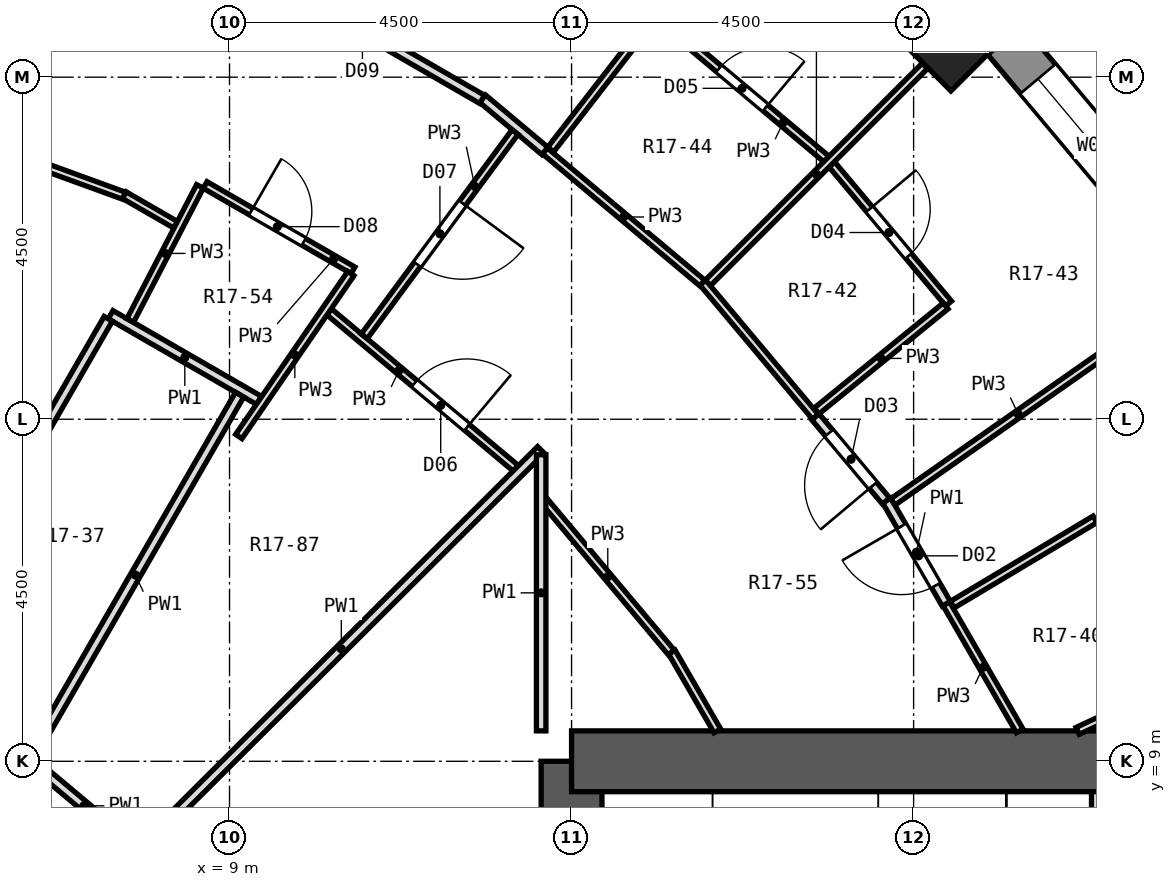
"""IFC4 building model, lengths in metres.
Left out: names, types, materials, properties, quantities, classifications, styles, units other than length and angle.
Written with IfcOpenShell. Run it as: python <this file> out.ifc"""

import sys

from ifc_helpers import new_model, si_unit, direction, frame, frame_2d, origin, origin_2d, place, context, subcontext, project, spatial, polyline, rectangle, outline, extrude, element, fill, save


model = new_model("IFC4")
c1 = context("Model", 3, precision=1e-05, world=origin(), true_north=direction((0.0, 1.0)))
c2 = subcontext(c1, "Body", "Model", "MODEL_VIEW")
j1 = project(units=[si_unit("LENGTHUNIT", "METRE"), si_unit("PLANEANGLEUNIT", "RADIAN")], contexts=[c1])
p1 = place(None, origin())
s1 = spatial("IfcSite", under=j1, at=p1, CompositionType="ELEMENT")
p2 = place(p1, origin())
s2 = spatial("IfcBuilding", under=s1, at=p2, CompositionType="ELEMENT")
p3 = place(p2, frame((0.0, 0.0, 91.9)))
s3 = spatial("IfcBuildingStorey", under=s2, at=p3, CompositionType="ELEMENT", Elevation=91.9)
p4 = place(p3, frame((18.491, 18.491, 0.0), z_axis=(0.0, 0.0, 1.0), x_axis=(0.707106781187, 0.707106781187, 0.0)))
e1 = element("IfcColumn", 1, at=p4, inside=s3, PredefinedType="COLUMN", context=c2, shape_type="SweptSolid", body=[
    extrude(rectangle(XDim=0.95, YDim=0.95, at=origin_2d()), origin(), (0.0, 0.0, 1.0), 3.3),
])
p5 = place(p3, frame((13.5, -9.0, 0.0), z_axis=(0.0, 0.0, 1.0), x_axis=(0.0, 1.0, 0.0)))
e2 = element("IfcWall", 2, at=p5, inside=s3, PredefinedType="SHEAR", context=c2, shape_type="SweptSolid", body=[
    extrude(rectangle(XDim=18.0, YDim=0.8, at=frame_2d((9.0, 0.0))), origin(), (0.0, 0.0, 1.0), 3.3),
])
p6 = place(p5, frame((15.4, 0.0, 0.0)))
e3 = element("IfcOpeningElement", 3, at=p6, cuts=e2, PredefinedType="OPENING", context=c2, shape_type="SweptSolid", body=[
    extrude(rectangle(XDim=1.2, YDim=2.1, at=frame_2d((0.6, 1.05))), frame((0.0, 0.412, 0.0), z_axis=(0.0, -1.0, 0.0), x_axis=(1.0, 0.0, 0.0)), (0.0, 0.0, 1.0), 0.824),
])
p7 = place(p5, frame((1.4, 0.0, 0.0)))
e4 = element("IfcOpeningElement", 4, at=p7, cuts=e2, PredefinedType="OPENING", context=c2, shape_type="SweptSolid", body=[
    extrude(rectangle(XDim=1.2, YDim=2.1, at=frame_2d((0.6, 1.05))), frame((0.0, 0.412, 0.0), z_axis=(0.0, -1.0, 0.0), x_axis=(1.0, 0.0, 0.0)), (0.0, 0.0, 1.0), 0.824),
])
p8 = place(p5, frame((7.5, 0.0, 0.0)))
e5 = element("IfcOpeningElement", 5, at=p8, cuts=e2, PredefinedType="OPENING", context=c2, shape_type="SweptSolid", body=[
    extrude(rectangle(XDim=3.0, YDim=2.4, at=frame_2d((1.5, 1.2))), frame((0.0, 0.412, 0.0), z_axis=(0.0, -1.0, 0.0), x_axis=(1.0, 0.0, 0.0)), (0.0, 0.0, 1.0), 0.824),
])
p9 = place(p3, frame((13.5, 9.0, 0.0), z_axis=(0.0, 0.0, 1.0), x_axis=(1.0, 0.0, 0.0)))
e6 = element("IfcWall", 6, at=p9, inside=s3, PredefinedType="SHEAR", context=c2, shape_type="SweptSolid", body=[
    extrude(rectangle(XDim=10.4, YDim=0.8, at=frame_2d((5.2, 0.0))), origin(), (0.0, 0.0, 1.0), 3.3),
])
p10 = place(p3, frame((21.547, 15.699, 0.0), z_axis=(0.0, 0.0, 1.0), x_axis=(-0.642774476932, 0.766055462616, 0.0)))
e7 = element("IfcWall", 7, at=p10, inside=s3, PredefinedType="SOLIDWALL", context=c2, shape_type="SweptSolid", body=[
    extrude(rectangle(XDim=3.648, YDim=0.6, at=frame_2d((1.824, 0.0))), origin(), (0.0, 0.0, 1.0), 2.8),
])
p11 = place(p10, frame((0.674, 0.0, 0.9)))
e8 = element("IfcOpeningElement", 8, at=p11, cuts=e7, PredefinedType="OPENING", context=c2, shape_type="SweptSolid", body=[
    extrude(rectangle(XDim=2.3, YDim=1.8, at=frame_2d((1.15, 0.9))), frame((0.0, 0.312, 0.0), z_axis=(0.0, -1.0, 0.0), x_axis=(1.0, 0.0, 0.0)), (0.0, 0.0, 1.0), 0.624),
])
p12 = place(p3, origin())
e9 = element("IfcWall", 9, at=p12, inside=s3, PredefinedType="SOLIDWALL", context=c2, shape_type="SweptSolid", body=[
    extrude(outline(polyline([(19.432, 18.686), (18.686, 19.432), (18.301, 18.972), (18.491, 19.163), (19.163, 18.491), (18.972, 18.301), (19.432, 18.686)])), origin(), (0.0, 0.0, 1.0), 2.8),
])
p13 = place(p3, frame((14.819, 10.438, 0.0), z_axis=(0.0, 0.0, 1.0), x_axis=(0.500016292001, -0.866015997389, 0.0)))
e10 = element("IfcWall", 10, at=p13, inside=s3, PredefinedType="PARTITIONING", context=c2, shape_type="SweptSolid", body=[
    extrude(rectangle(XDim=1.199, YDim=0.1, at=frame_2d((0.599, 0.0))), origin(), (0.0, 0.0, 1.0), 2.8),
])
p14 = place(p3, frame((18.43, 11.072, 0.0), z_axis=(0.0, 0.0, 1.0), x_axis=(0.500203884267, -0.865907659144, 0.0)))
e11 = element("IfcWall", 11, at=p14, inside=s3, PredefinedType="PARTITIONING", context=c2, shape_type="SweptSolid", body=[
    extrude(rectangle(XDim=1.931, YDim=0.1, at=frame_2d((0.966, 0.0))), origin(), (0.0, 0.0, 1.0), 2.8),
])
p15 = place(p3, frame((17.645, 12.432, 0.0), z_axis=(0.0, 0.0, 1.0), x_axis=(0.499852597388, -0.866110489998, 0.0)))
e12 = element("IfcWall", 12, at=p15, inside=s3, PredefinedType="PARTITIONING", context=c2, shape_type="SweptSolid", body=[
    extrude(rectangle(XDim=1.57, YDim=0.125, at=frame_2d((0.785, 0.0))), origin(), (0.0, 0.0, 1.0), 2.8),
])
p16 = place(p15, frame((0.392, 0.0, 0.0)))
e13 = element("IfcOpeningElement", 13, at=p16, cuts=e12, PredefinedType="OPENING", context=c2, shape_type="SweptSolid", body=[
    extrude(rectangle(XDim=0.9, YDim=2.1, at=frame_2d((0.45, 1.05))), frame((0.0, 0.074, 0.0), z_axis=(0.0, -1.0, 0.0), x_axis=(1.0, 0.0, 0.0)), (0.0, 0.0, 1.0), 0.149),
])
p17 = place(p3, frame((20.43, 12.209, 0.0), z_axis=(0.0, 0.0, 1.0), x_axis=(0.500061428766, -0.865989934965, 0.0)))
e14 = element("IfcWall", 14, at=p17, inside=s3, PredefinedType="PARTITIONING", context=c2, shape_type="SweptSolid", body=[
    extrude(rectangle(XDim=2.39, YDim=0.1, at=frame_2d((1.195, 0.0))), origin(), (0.0, 0.0, 1.0), 2.8),
])
p18 = place(p17, frame((0.82, 0.0, 0.0)))
e15 = element("IfcOpeningElement", 15, at=p18, cuts=e14, PredefinedType="OPENING", context=c2, shape_type="SweptSolid", body=[
    extrude(rectangle(XDim=0.8, YDim=2.1, at=frame_2d((0.4, 1.05))), frame((0.0, 0.062, 0.0), z_axis=(0.0, -1.0, 0.0), x_axis=(1.0, 0.0, 0.0)), (0.0, 0.0, 1.0), 0.124),
])
p19 = place(p3, frame((13.14, 12.425, 0.0), z_axis=(0.0, 0.0, 1.0), x_axis=(0.642692247105, -0.766124451712, 0.0)))
e16 = element("IfcWall", 16, at=p19, inside=s3, PredefinedType="PARTITIONING", context=c2, shape_type="SweptSolid", body=[
    extrude(rectangle(XDim=2.601, YDim=0.1, at=frame_2d((1.301, 0.0))), origin(), (0.0, 0.0, 1.0), 2.8),
])
p20 = place(p3, frame((15.226, 15.299, 0.0), z_axis=(0.0, 0.0, 1.0), x_axis=(0.642762571273, -0.766065452145, 0.0)))
e17 = element("IfcWall", 17, at=p20, inside=s3, PredefinedType="PARTITIONING", context=c2, shape_type="SweptSolid", body=[
    extrude(rectangle(XDim=2.307, YDim=0.1, at=frame_2d((1.153, 0.0))), origin(), (0.0, 0.0, 1.0), 2.8),
])
p21 = place(p3, frame((16.708, 13.532, 0.0), z_axis=(0.0, 0.0, 1.0), x_axis=(0.642641061866, -0.766167387458, 0.0)))
e18 = element("IfcWall", 18, at=p21, inside=s3, PredefinedType="PARTITIONING", context=c2, shape_type="SweptSolid", body=[
    extrude(rectangle(XDim=1.445, YDim=0.125, at=frame_2d((0.722, 0.0))), origin(), (0.0, 0.0, 1.0), 2.8),
])
p22 = place(p21, frame((0.279, 0.0, 0.0)))
e19 = element("IfcOpeningElement", 19, at=p22, cuts=e18, PredefinedType="OPENING", context=c2, shape_type="SweptSolid", body=[
    extrude(rectangle(XDim=0.9, YDim=2.1, at=frame_2d((0.45, 1.05))), frame((0.0, 0.074, 0.0), z_axis=(0.0, -1.0, 0.0), x_axis=(1.0, 0.0, 0.0)), (0.0, 0.0, 1.0), 0.149),
])
p23 = place(p3, frame((16.923, 16.853, 0.0), z_axis=(0.0, 0.0, 1.0), x_axis=(0.642942941421, -0.765914077477, 0.0)))
e20 = element("IfcWall", 20, at=p23, inside=s3, PredefinedType="PARTITIONING", context=c2, shape_type="SweptSolid", body=[
    extrude(rectangle(XDim=2.39, YDim=0.1, at=frame_2d((1.195, 0.0))), origin(), (0.0, 0.0, 1.0), 2.8),
])
p24 = place(p23, frame((0.77, 0.0, 0.0)))
e21 = element("IfcOpeningElement", 21, at=p24, cuts=e20, PredefinedType="OPENING", context=c2, shape_type="SweptSolid", body=[
    extrude(rectangle(XDim=0.8, YDim=2.1, at=frame_2d((0.4, 1.05))), frame((0.0, 0.062, 0.0), z_axis=(0.0, -1.0, 0.0), x_axis=(1.0, 0.0, 0.0)), (0.0, 0.0, 1.0), 0.124),
])
p25 = place(p3, frame((6.409, 8.981, 0.0), z_axis=(0.0, 0.0, 1.0), x_axis=(0.766209131969, -0.642591290081, 0.0)))
e22 = element("IfcWall", 22, at=p25, inside=s3, PredefinedType="PARTITIONING", context=c2, shape_type="SweptSolid", body=[
    extrude(rectangle(XDim=1.764, YDim=0.125, at=frame_2d((0.882, 0.0))), origin(), (0.0, 0.0, 1.0), 2.8),
])
p26 = place(p3, frame((10.311, 14.914, 0.0), z_axis=(0.0, 0.0, 1.0), x_axis=(0.766187913062, -0.642616590104, 0.0)))
e23 = element("IfcWall", 23, at=p26, inside=s3, PredefinedType="PARTITIONING", context=c2, shape_type="SweptSolid", body=[
    extrude(rectangle(XDim=3.205, YDim=0.1, at=frame_2d((1.602, 0.0))), origin(), (0.0, 0.0, 1.0), 2.8),
])
p27 = place(p26, frame((1.466, 0.0, 0.0)))
e24 = element("IfcOpeningElement", 24, at=p27, cuts=e23, PredefinedType="OPENING", context=c2, shape_type="SweptSolid", body=[
    extrude(rectangle(XDim=0.9, YDim=2.1, at=frame_2d((0.45, 1.05))), frame((0.0, 0.062, 0.0), z_axis=(0.0, -1.0, 0.0), x_axis=(1.0, 0.0, 0.0)), (0.0, 0.0, 1.0), 0.124),
])
p28 = place(p3, frame((13.149, 17.03, 0.0), z_axis=(0.0, 0.0, 1.0), x_axis=(0.766003631775, -0.642836243617, 0.0)))
e25 = element("IfcWall", 25, at=p28, inside=s3, PredefinedType="PARTITIONING", context=c2, shape_type="SweptSolid", body=[
    extrude(rectangle(XDim=2.704, YDim=0.1, at=frame_2d((1.352, 0.0))), origin(), (0.0, 0.0, 1.0), 2.8),
])
p29 = place(p3, frame((12.328, 17.718, 0.0), z_axis=(0.0, 0.0, 1.0), x_axis=(0.766311067441, -0.642469725292, 0.0)))
e26 = element("IfcWall", 26, at=p29, inside=s3, PredefinedType="PARTITIONING", context=c2, shape_type="SweptSolid", body=[
    extrude(rectangle(XDim=1.071, YDim=0.125, at=frame_2d((0.535, 0.0))), origin(), (0.0, 0.0, 1.0), 2.8),
])
p30 = place(p3, frame((14.597, 18.816, 0.0), z_axis=(0.0, 0.0, 1.0), x_axis=(0.766055897741, -0.642773958353, 0.0)))
e27 = element("IfcWall", 27, at=p30, inside=s3, PredefinedType="PARTITIONING", context=c2, shape_type="SweptSolid", body=[
    extrude(rectangle(XDim=2.945, YDim=0.1, at=frame_2d((1.472, 0.0))), origin(), (0.0, 0.0, 1.0), 2.8),
])
p31 = place(p30, frame((1.097, 0.0, 0.0)))
e28 = element("IfcOpeningElement", 28, at=p31, cuts=e27, PredefinedType="OPENING", context=c2, shape_type="SweptSolid", body=[
    extrude(rectangle(XDim=0.8, YDim=2.1, at=frame_2d((0.4, 1.05))), frame((0.0, 0.062, 0.0), z_axis=(0.0, -1.0, 0.0), x_axis=(1.0, 0.0, 0.0)), (0.0, 0.0, 1.0), 0.124),
])
p32 = place(p3, frame((7.436, 14.875, 0.0), z_axis=(0.0, 0.0, 1.0), x_axis=(0.866028691075, -0.499994306202, 0.0)))
e29 = element("IfcWall", 29, at=p32, inside=s3, PredefinedType="PARTITIONING", context=c2, shape_type="SweptSolid", body=[
    extrude(rectangle(XDim=2.254, YDim=0.125, at=frame_2d((1.127, 0.0))), origin(), (0.0, 0.0, 1.0), 2.8),
])
p33 = place(p3, frame((7.614, 16.449, 0.0), z_axis=(0.0, 0.0, 1.0), x_axis=(0.866201164306, -0.499695450205, 0.0)))
e30 = element("IfcWall", 30, at=p33, inside=s3, PredefinedType="PARTITIONING", context=c2, shape_type="SweptSolid", body=[
    extrude(rectangle(XDim=0.783, YDim=0.1, at=frame_2d((0.391, 0.0))), origin(), (0.0, 0.0, 1.0), 2.8),
])
p34 = place(p3, frame((8.679, 16.582, 0.0), z_axis=(0.0, 0.0, 1.0), x_axis=(0.866122264928, -0.499832194037, 0.0)))
e31 = element("IfcWall", 31, at=p34, inside=s3, PredefinedType="PARTITIONING", context=c2, shape_type="SweptSolid", body=[
    extrude(rectangle(XDim=2.247, YDim=0.1, at=frame_2d((1.124, 0.0))), origin(), (0.0, 0.0, 1.0), 2.8),
])
p35 = place(p34, frame((0.698, 0.0, 0.0)))
e32 = element("IfcOpeningElement", 32, at=p35, cuts=e31, PredefinedType="OPENING", context=c2, shape_type="SweptSolid", body=[
    extrude(rectangle(XDim=0.8, YDim=2.1, at=frame_2d((0.4, 1.05))), frame((0.0, 0.062, 0.0), z_axis=(0.0, -1.0, 0.0), x_axis=(1.0, 0.0, 0.0)), (0.0, 0.0, 1.0), 0.124),
])
p36 = place(p3, frame((9.065, 19.59, 0.0), z_axis=(0.0, 0.0, 1.0), x_axis=(0.865961876044, -0.500110017135, 0.0)))
e33 = element("IfcWall", 33, at=p36, inside=s3, PredefinedType="PARTITIONING", context=c2, shape_type="SweptSolid", body=[
    extrude(rectangle(XDim=3.762, YDim=0.125, at=frame_2d((1.881, 0.0))), origin(), (0.0, 0.0, 1.0), 2.8),
])
p37 = place(p36, frame((1.494, 0.0, 0.0)))
e34 = element("IfcOpeningElement", 34, at=p37, cuts=e33, PredefinedType="OPENING", context=c2, shape_type="SweptSolid", body=[
    extrude(rectangle(XDim=0.9, YDim=2.1, at=frame_2d((0.45, 1.05))), frame((0.0, 0.074, 0.0), z_axis=(0.0, -1.0, 0.0), x_axis=(1.0, 0.0, 0.0)), (0.0, 0.0, 1.0), 0.149),
])
p38 = place(p3, frame((4.642, 17.521, 0.0), z_axis=(0.0, 0.0, 1.0), x_axis=(0.939739258447, -0.341891980211, 0.0)))
e35 = element("IfcWall", 35, at=p38, inside=s3, PredefinedType="PARTITIONING", context=c2, shape_type="SweptSolid", body=[
    extrude(rectangle(XDim=3.159, YDim=0.1, at=frame_2d((1.58, 0.0))), origin(), (0.0, 0.0, 1.0), 2.8),
])
p39 = place(p38, frame((1.18, 0.0, 0.0)))
e36 = element("IfcOpeningElement", 36, at=p39, cuts=e35, PredefinedType="OPENING", context=c2, shape_type="SweptSolid", body=[
    extrude(rectangle(XDim=0.9, YDim=2.1, at=frame_2d((0.45, 1.05))), frame((0.0, 0.062, 0.0), z_axis=(0.0, -1.0, 0.0), x_axis=(1.0, 0.0, 0.0)), (0.0, 0.0, 1.0), 0.124),
])
p40 = place(p3, frame((20.158, 9.4, 0.0), z_axis=(0.0, 0.0, 1.0), x_axis=(0.906223222272, 0.422799564114, 0.0)))
e37 = element("IfcWall", 37, at=p40, inside=s3, PredefinedType="PARTITIONING", context=c2, shape_type="SweptSolid", body=[
    extrude(rectangle(XDim=3.423, YDim=0.1, at=frame_2d((1.711, 0.0))), origin(), (0.0, 0.0, 1.0), 2.8),
])
p41 = place(p3, frame((18.509, 11.061, 0.0), z_axis=(0.0, 0.0, 1.0), x_axis=(0.85844638645, 0.512903306279, 0.0)))
e38 = element("IfcWall", 38, at=p41, inside=s3, PredefinedType="PARTITIONING", context=c2, shape_type="SweptSolid", body=[
    extrude(rectangle(XDim=2.188, YDim=0.1, at=frame_2d((1.094, 0.0))), origin(), (0.0, 0.0, 1.0), 2.8),
])
p42 = place(p3, frame((17.728, 12.413, 0.0), z_axis=(0.0, 0.0, 1.0), x_axis=(0.819106461113, 0.573641530368, 0.0)))
e39 = element("IfcWall", 39, at=p42, inside=s3, PredefinedType="PARTITIONING", context=c2, shape_type="SweptSolid", body=[
    extrude(rectangle(XDim=4.023, YDim=0.1, at=frame_2d((2.012, 0.0))), origin(), (0.0, 0.0, 1.0), 2.8),
])
p43 = place(p3, frame((16.724, 13.609, 0.0), z_axis=(0.0, 0.0, 1.0), x_axis=(0.77556073315, 0.631272959342, 0.0)))
e40 = element("IfcWall", 40, at=p43, inside=s3, PredefinedType="PARTITIONING", context=c2, shape_type="SweptSolid", body=[
    extrude(rectangle(XDim=2.188, YDim=0.1, at=frame_2d((1.094, 0.0))), origin(), (0.0, 0.0, 1.0), 2.8),
])
p44 = place(p3, frame((7.844, 7.861, 0.0), z_axis=(0.0, 0.0, 1.0), x_axis=(0.708356490253, 0.705854859526, 0.0)))
e41 = element("IfcWall", 41, at=p44, inside=s3, PredefinedType="PARTITIONING", context=c2, shape_type="SweptSolid", body=[
    extrude(rectangle(XDim=7.417, YDim=0.125, at=frame_2d((3.708, 0.0))), origin(), (0.0, 0.0, 1.0), 2.8),
])
p45 = place(p3, frame((15.294, 15.294, 0.0), z_axis=(0.0, 0.0, 1.0), x_axis=(0.707106781187, 0.707106781187, 0.0)))
e42 = element("IfcWall", 42, at=p45, inside=s3, PredefinedType="PARTITIONING", context=c2, shape_type="SweptSolid", body=[
    extrude(rectangle(XDim=4.035, YDim=0.1, at=frame_2d((2.018, 0.0))), origin(), (0.0, 0.0, 1.0), 2.8),
])
p46 = place(p3, frame((13.225, 17.047, 0.0), z_axis=(0.0, 0.0, 1.0), x_axis=(0.612827784587, 0.790216493398, 0.0)))
e43 = element("IfcWall", 43, at=p46, inside=s3, PredefinedType="PARTITIONING", context=c2, shape_type="SweptSolid", body=[
    extrude(rectangle(XDim=2.188, YDim=0.1, at=frame_2d((1.094, 0.0))), origin(), (0.0, 0.0, 1.0), 2.8),
])
p47 = place(p3, frame((10.773, 14.591, 0.0), z_axis=(0.0, 0.0, 1.0), x_axis=(0.593899624956, 0.804539144776, 0.0)))
e44 = element("IfcWall", 44, at=p47, inside=s3, PredefinedType="PARTITIONING", context=c2, shape_type="SweptSolid", body=[
    extrude(rectangle(XDim=3.339, YDim=0.1, at=frame_2d((1.669, 0.0))), origin(), (0.0, 0.0, 1.0), 2.8),
])
p48 = place(p47, frame((1.176, 0.0, 0.0)))
e45 = element("IfcOpeningElement", 45, at=p48, cuts=e44, PredefinedType="OPENING", context=c2, shape_type="SweptSolid", body=[
    extrude(rectangle(XDim=1.0, YDim=2.1, at=frame_2d((0.5, 1.05))), frame((0.0, 0.062, 0.0), z_axis=(0.0, -1.0, 0.0), x_axis=(1.0, 0.0, 0.0)), (0.0, 0.0, 1.0), 0.124),
])
p49 = place(p3, frame((9.122, 13.272, 0.0), z_axis=(0.0, 0.0, 1.0), x_axis=(0.566405338298, 0.82412680623, 0.0)))
e46 = element("IfcWall", 46, at=p49, inside=s3, PredefinedType="PARTITIONING", context=c2, shape_type="SweptSolid", body=[
    extrude(rectangle(XDim=2.601, YDim=0.1, at=frame_2d((1.301, 0.0))), origin(), (0.0, 0.0, 1.0), 2.8),
])
p50 = place(p3, frame((6.393, 9.075, 0.0), z_axis=(0.0, 0.0, 1.0), x_axis=(0.499717313028, 0.866188551679, 0.0)))
e47 = element("IfcWall", 47, at=p50, inside=s3, PredefinedType="PARTITIONING", context=c2, shape_type="SweptSolid", body=[
    extrude(rectangle(XDim=5.482, YDim=0.125, at=frame_2d((2.741, 0.0))), origin(), (0.0, 0.0, 1.0), 2.8),
])
p51 = place(p3, frame((4.666, 10.072, 0.0), z_axis=(0.0, 0.0, 1.0), x_axis=(0.499564368271, 0.866276769834, 0.0)))
e48 = element("IfcWall", 48, at=p51, inside=s3, PredefinedType="PARTITIONING", context=c2, shape_type="SweptSolid", body=[
    extrude(rectangle(XDim=5.482, YDim=0.125, at=frame_2d((2.741, 0.0))), origin(), (0.0, 0.0, 1.0), 2.8),
])
p52 = place(p3, frame((7.694, 14.8, 0.0), z_axis=(0.0, 0.0, 1.0), x_axis=(0.461012435149, 0.887393675117, 0.0)))
e49 = element("IfcWall", 49, at=p52, inside=s3, PredefinedType="PARTITIONING", context=c2, shape_type="SweptSolid", body=[
    extrude(rectangle(XDim=1.988, YDim=0.1, at=frame_2d((0.994, 0.0))), origin(), (0.0, 0.0, 1.0), 2.8),
])
p53 = place(p3, frame((13.1, 9.4, 0.0), z_axis=(0.0, 0.0, 1.0), x_axis=(0.0, 1.0, 0.0)))
e50 = element("IfcWall", 50, at=p53, inside=s3, PredefinedType="PARTITIONING", context=c2, shape_type="SweptSolid", body=[
    extrude(rectangle(XDim=3.633, YDim=0.125, at=frame_2d((1.816, 0.0))), origin(), (0.0, 0.0, 1.0), 2.8),
])
p54 = place(p3, frame((20.39, 5.25, 0.0), z_axis=(0.0, 0.0, 1.0), x_axis=(0.0, 1.0, 0.0)))
e51 = element("IfcWall", 51, at=p54, inside=s3, PredefinedType="PARTITIONING", context=c2, shape_type="SweptSolid", body=[
    extrude(rectangle(XDim=3.35, YDim=0.1, at=frame_2d((1.675, 0.0))), origin(), (0.0, 0.0, 1.0), 2.8),
])
p55 = place(p11, origin())
e52 = element("IfcWindow", 52, at=p55, inside=s3, PartitioningType="SINGLE_PANEL", PredefinedType="WINDOW", context=c2, shape_type="SweptSolid", body=[
    extrude(rectangle(XDim=2.3, YDim=1.8, at=frame_2d((1.15, 0.9))), frame((0.0, 0.18, 0.0), z_axis=(0.0, -1.0, 0.0), x_axis=(1.0, 0.0, 0.0)), (0.0, 0.0, 1.0), 0.06),
])
fill(e8, e52)
p56 = place(p16, frame((0.9, 0.0, 0.0), z_axis=(0.0, 0.0, 1.0), x_axis=(-1.0, 0.0, 0.0)))
e53 = element("IfcDoor", 53, at=p56, inside=s3, OperationType="SINGLE_SWING_RIGHT", PredefinedType="DOOR", context=c2, shape_type="SweptSolid", body=[
    extrude(rectangle(XDim=0.9, YDim=2.1, at=frame_2d((0.45, 1.05))), frame((0.0, 0.025, 0.0), z_axis=(0.0, -1.0, 0.0), x_axis=(1.0, 0.0, 0.0)), (0.0, 0.0, 1.0), 0.05),
])
fill(e13, e53)
p57 = place(p22, frame((0.9, 0.0, 0.0), z_axis=(0.0, 0.0, 1.0), x_axis=(-1.0, 0.0, 0.0)))
e54 = element("IfcDoor", 54, at=p57, inside=s3, OperationType="SINGLE_SWING_LEFT", PredefinedType="DOOR", context=c2, shape_type="SweptSolid", body=[
    extrude(rectangle(XDim=0.9, YDim=2.1, at=frame_2d((0.45, 1.05))), frame((0.0, 0.025, 0.0), z_axis=(0.0, -1.0, 0.0), x_axis=(1.0, 0.0, 0.0)), (0.0, 0.0, 1.0), 0.05),
])
fill(e19, e54)
p58 = place(p24, origin())
e55 = element("IfcDoor", 55, at=p58, inside=s3, OperationType="SINGLE_SWING_LEFT", PredefinedType="DOOR", context=c2, shape_type="SweptSolid", body=[
    extrude(rectangle(XDim=0.8, YDim=2.1, at=frame_2d((0.4, 1.05))), frame((0.0, 0.025, 0.0), z_axis=(0.0, -1.0, 0.0), x_axis=(1.0, 0.0, 0.0)), (0.0, 0.0, 1.0), 0.05),
])
fill(e21, e55)
p59 = place(p31, origin())
e56 = element("IfcDoor", 56, at=p59, inside=s3, OperationType="SINGLE_SWING_RIGHT", PredefinedType="DOOR", context=c2, shape_type="SweptSolid", body=[
    extrude(rectangle(XDim=0.8, YDim=2.1, at=frame_2d((0.4, 1.05))), frame((0.0, 0.025, 0.0), z_axis=(0.0, -1.0, 0.0), x_axis=(1.0, 0.0, 0.0)), (0.0, 0.0, 1.0), 0.05),
])
fill(e28, e56)
p60 = place(p27, origin())
e57 = element("IfcDoor", 57, at=p60, inside=s3, OperationType="SINGLE_SWING_RIGHT", PredefinedType="DOOR", context=c2, shape_type="SweptSolid", body=[
    extrude(rectangle(XDim=0.9, YDim=2.1, at=frame_2d((0.45, 1.05))), frame((0.0, 0.025, 0.0), z_axis=(0.0, -1.0, 0.0), x_axis=(1.0, 0.0, 0.0)), (0.0, 0.0, 1.0), 0.05),
])
fill(e24, e57)
p61 = place(p48, frame((1.0, 0.0, 0.0), z_axis=(0.0, 0.0, 1.0), x_axis=(-1.0, 0.0, 0.0)))
e58 = element("IfcDoor", 58, at=p61, inside=s3, OperationType="SINGLE_SWING_LEFT", PredefinedType="DOOR", context=c2, shape_type="SweptSolid", body=[
    extrude(rectangle(XDim=1.0, YDim=2.1, at=frame_2d((0.5, 1.05))), frame((0.0, 0.025, 0.0), z_axis=(0.0, -1.0, 0.0), x_axis=(1.0, 0.0, 0.0)), (0.0, 0.0, 1.0), 0.05),
])
fill(e45, e58)
p62 = place(p35, origin())
e59 = element("IfcDoor", 59, at=p62, inside=s3, OperationType="SINGLE_SWING_LEFT", PredefinedType="DOOR", context=c2, shape_type="SweptSolid", body=[
    extrude(rectangle(XDim=0.8, YDim=2.1, at=frame_2d((0.4, 1.05))), frame((0.0, 0.025, 0.0), z_axis=(0.0, -1.0, 0.0), x_axis=(1.0, 0.0, 0.0)), (0.0, 0.0, 1.0), 0.05),
])
fill(e32, e59)
save(model, sys.argv[1])
